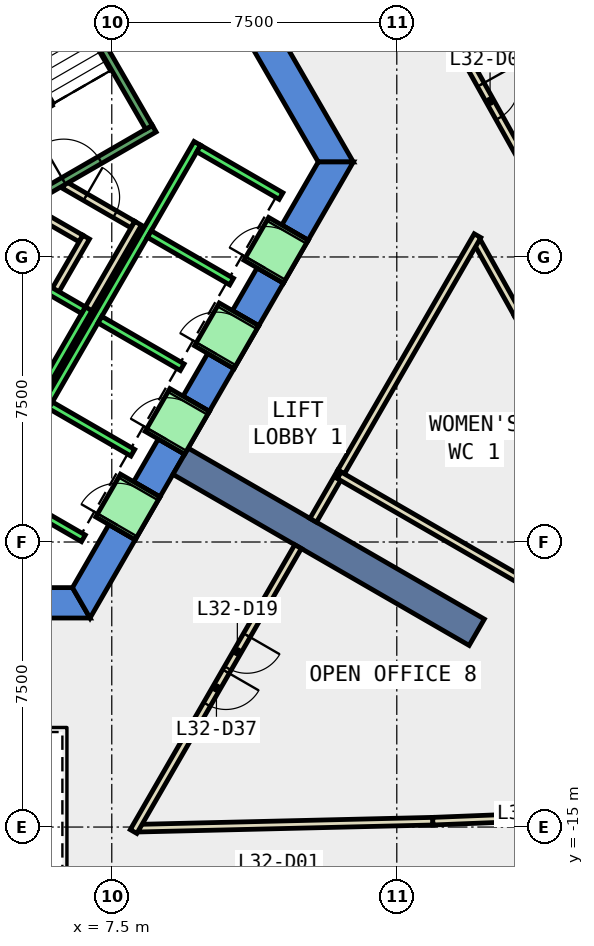
"""IFC4 building model, lengths in metres.
Left out: names, types, materials, properties, quantities, classifications, styles, units other than length and angle.
Written with IfcOpenShell. Run it as: python <this file> out.ifc"""

import sys

from ifc_helpers import new_model, si_unit, direction, frame, frame_2d, origin, place, context, subcontext, project, spatial, polyline, rectangle, outline, extrude, element, fill, save


model = new_model("IFC4")
c1 = context("Model", 3, precision=1e-05, world=origin(), true_north=direction((0.0, 1.0)))
c2 = subcontext(c1, "Body", "Model", "MODEL_VIEW")
j1 = project(units=[si_unit("LENGTHUNIT", "METRE"), si_unit("PLANEANGLEUNIT", "RADIAN")], contexts=[c1])
p1 = place(None, origin())
s1 = spatial("IfcSite", under=j1, at=p1, CompositionType="ELEMENT")
p2 = place(p1, origin())
s2 = spatial("IfcBuilding", under=s1, at=p2, CompositionType="ELEMENT")
p3 = place(p2, frame((0.0, 0.0, 146.6)))
s3 = spatial("IfcBuildingStorey", under=s2, at=p3, CompositionType="ELEMENT", Elevation=146.6)
p4 = place(p3, frame((0.0, 0.0, -0.4)))
e1 = element("IfcWall", 1, at=p4, inside=s3, PredefinedType="SHEAR", context=c2, shape_type="SweptSolid", body=[
    extrude(outline(polyline([(8.517, 11.748), (7.824, 11.348), (12.933, 2.5), (13.856, 2.5), (8.517, 11.748)])), origin(), (0.0, 0.0, 1.0), 4.2),
])
p5 = place(p3, frame((0.0, 0.0, -0.4)))
e2 = element("IfcWall", 2, at=p5, inside=s3, PredefinedType="SHEAR", context=c2, shape_type="SweptSolid", body=[
    extrude(outline(polyline([(5.75, -8.7), (5.75, -9.5), (6.928, -9.5), (6.466, -8.7), (5.75, -8.7)])), origin(), (0.0, 0.0, 1.0), 4.2),
])
p6 = place(p3, frame((0.0, 0.0, -0.4)))
e3 = element("IfcWall", 3, at=p6, inside=s3, PredefinedType="SHEAR", context=c2, shape_type="SweptSolid", body=[
    extrude(outline(polyline([(8.117, -7.44), (7.424, -7.04), (6.466, -8.7), (6.928, -9.5), (8.117, -7.44)])), origin(), (0.0, 0.0, 1.0), 4.2),
])
p7 = place(p3, frame((0.0, 0.0, -0.4)))
e4 = element("IfcWall", 4, at=p7, inside=s3, PredefinedType="SHEAR", context=c2, shape_type="SweptSolid", body=[
    extrude(outline(polyline([(9.417, -5.189), (8.724, -4.789), (8.075, -5.914), (8.767, -6.314), (9.417, -5.189)])), origin(), (0.0, 0.0, 1.0), 4.2),
])
p8 = place(p3, frame((0.0, 0.0, -0.4)))
e5 = element("IfcWall", 5, at=p8, inside=s3, PredefinedType="SHEAR", context=c2, shape_type="SweptSolid", body=[
    extrude(outline(polyline([(10.717, -2.937), (10.025, -2.537), (9.374, -3.663), (10.067, -4.063), (10.717, -2.937)])), origin(), (0.0, 0.0, 1.0), 4.2),
])
p9 = place(p3, frame((0.0, 0.0, -0.4)))
e6 = element("IfcWall", 6, at=p9, inside=s3, PredefinedType="SHEAR", context=c2, shape_type="SweptSolid", body=[
    extrude(outline(polyline([(12.017, -0.686), (11.324, -0.286), (10.675, -1.411), (11.367, -1.811), (12.017, -0.686)])), origin(), (0.0, 0.0, 1.0), 4.2),
])
p10 = place(p3, frame((0.0, 0.0, -0.4)))
e7 = element("IfcWall", 7, at=p10, inside=s3, PredefinedType="SHEAR", context=c2, shape_type="SweptSolid", body=[
    extrude(outline(polyline([(11.974, 0.84), (12.667, 0.44), (13.856, 2.5), (12.933, 2.5), (11.974, 0.84)])), origin(), (0.0, 0.0, 1.0), 4.2),
])
p11 = place(p3, frame((0.0, 0.0, 3.6)))
e8 = element("IfcWall", 8, at=p11, inside=s3, PredefinedType="SHEAR", context=c2, shape_type="SweptSolid", body=[
    extrude(outline(polyline([(8.767, -6.314), (8.075, -5.914), (7.424, -7.04), (8.117, -7.44), (8.767, -6.314)])), origin(), (0.0, 0.0, 1.0), 0.2),
])
p12 = place(p3, frame((0.0, 0.0, 3.6)))
e9 = element("IfcWall", 9, at=p12, inside=s3, PredefinedType="SHEAR", context=c2, shape_type="SweptSolid", body=[
    extrude(outline(polyline([(10.067, -4.063), (9.374, -3.663), (8.724, -4.789), (9.417, -5.189), (10.067, -4.063)])), origin(), (0.0, 0.0, 1.0), 0.2),
])
p13 = place(p3, frame((0.0, 0.0, 3.6)))
e10 = element("IfcWall", 10, at=p13, inside=s3, PredefinedType="SHEAR", context=c2, shape_type="SweptSolid", body=[
    extrude(outline(polyline([(11.367, -1.811), (10.675, -1.411), (10.025, -2.537), (10.717, -2.937), (11.367, -1.811)])), origin(), (0.0, 0.0, 1.0), 0.2),
])
p14 = place(p3, frame((0.0, 0.0, 3.6)))
e11 = element("IfcWall", 11, at=p14, inside=s3, PredefinedType="SHEAR", context=c2, shape_type="SweptSolid", body=[
    extrude(outline(polyline([(12.667, 0.44), (11.974, 0.84), (11.324, -0.286), (12.017, -0.686), (12.667, 0.44)])), origin(), (0.0, 0.0, 1.0), 0.2),
])
p15 = place(p3, frame((9.31, -5.375, -0.4), z_axis=(0.0, 0.0, 1.0), x_axis=(0.866017533419, -0.500013631625, 0.0)))
e12 = element("IfcWall", 12, at=p15, inside=s3, PredefinedType="SHEAR", context=c2, shape_type="SweptSolid", body=[
    extrude(rectangle(XDim=9.0, YDim=0.8, at=frame_2d((4.5, 0.0))), origin(), (0.0, 0.0, 1.0), 4.2),
])
p16 = place(p3, frame((8.223, -15.029, 0.0), z_axis=(0.0, 0.0, 1.0), x_axis=(0.99971920994, 0.023696018186, 0.0)))
e13 = element("IfcWall", 13, at=p16, inside=s3, PredefinedType="PARTITIONING", context=c2, shape_type="SweptSolid", body=[
    extrude(rectangle(XDim=7.727, YDim=0.2, at=frame_2d((3.864, 0.0))), origin(), (0.0, 0.0, 1.0), 3.8),
])
p17 = place(p3, frame((15.948, -14.846, 0.0), z_axis=(0.0, 0.0, 1.0), x_axis=(0.999208477774, 0.039779617206, 0.0)))
e14 = element("IfcWall", 14, at=p17, inside=s3, PredefinedType="PARTITIONING", context=c2, shape_type="SweptSolid", body=[
    extrude(rectangle(XDim=2.639, YDim=0.2, at=frame_2d((1.32, 0.0))), origin(), (0.0, 0.0, 1.0), 3.8),
])
p18 = place(p3, frame((18.178, -1.501, 0.0), z_axis=(0.0, 0.0, 1.0), x_axis=(-0.487980809747, 0.872854357449, 0.0)))
e15 = element("IfcWall", 15, at=p18, inside=s3, PredefinedType="PARTITIONING", context=c2, shape_type="SweptSolid", body=[
    extrude(rectangle(XDim=2.162, YDim=0.2, at=frame_2d((1.081, 0.0))), origin(), (0.0, 0.0, 1.0), 3.8),
])
p19 = place(p3, frame((16.624, 5.582, 0.0), z_axis=(0.0, 0.0, 1.0), x_axis=(0.487871212611, -0.872915620152, 0.0)))
e16 = element("IfcWall", 16, at=p19, inside=s3, PredefinedType="PARTITIONING", context=c2, shape_type="SweptSolid", body=[
    extrude(rectangle(XDim=3.402, YDim=0.2, at=frame_2d((1.701, 0.0))), origin(), (0.0, 0.0, 1.0), 3.8),
])
p20 = place(p19, frame((1.202, 0.0, 0.0)))
e17 = element("IfcOpeningElement", 17, at=p20, cuts=e16, PredefinedType="OPENING", context=c2, shape_type="SweptSolid", body=[
    extrude(rectangle(XDim=1.0, YDim=2.1, at=frame_2d((0.5, 1.05))), frame((0.0, 0.11, 0.0), z_axis=(0.0, -1.0, 0.0), x_axis=(1.0, 0.0, 0.0)), (0.0, 0.0, 1.0), 0.22),
])
p21 = place(p3, frame((5.499, 1.172, 0.0), z_axis=(0.0, 0.0, 1.0), x_axis=(0.866333505267, -0.499465972466, 0.0)))
e18 = element("IfcWall", 18, at=p21, inside=s3, PredefinedType="PARTITIONING", context=c2, shape_type="SweptSolid", body=[
    extrude(rectangle(XDim=1.374, YDim=0.2, at=frame_2d((0.687, 0.0))), origin(), (0.0, 0.0, 1.0), 3.8),
])
p22 = place(p3, frame((6.826, 0.522, 0.0), z_axis=(0.0, 0.0, 1.0), x_axis=(-0.500016722714, -0.866015748706, 0.0)))
e19 = element("IfcWall", 19, at=p22, inside=s3, PredefinedType="PARTITIONING", context=c2, shape_type="SweptSolid", body=[
    extrude(rectangle(XDim=1.7, YDim=0.2, at=frame_2d((0.85, 0.0))), origin(), (0.0, 0.0, 1.0), 3.8),
])
p23 = place(p3, frame((6.25, 1.894, 0.0), z_axis=(0.0, 0.0, 1.0), x_axis=(0.866043184279, -0.499969202016, 0.0)))
e20 = element("IfcWall", 20, at=p23, inside=s3, PredefinedType="PARTITIONING", context=c2, shape_type="SweptSolid", body=[
    extrude(rectangle(XDim=2.084, YDim=0.2, at=frame_2d((1.042, 0.0))), origin(), (0.0, 0.0, 1.0), 3.8),
])
p24 = place(p23, frame((0.642, 0.0, 0.0)))
e21 = element("IfcOpeningElement", 21, at=p24, cuts=e20, PredefinedType="OPENING", context=c2, shape_type="SweptSolid", body=[
    extrude(rectangle(XDim=0.9, YDim=2.1, at=frame_2d((0.45, 1.05))), frame((0.0, 0.11, 0.0), z_axis=(0.0, -1.0, 0.0), x_axis=(1.0, 0.0, 0.0)), (0.0, 0.0, 1.0), 0.22),
])
p25 = place(p3, frame((8.192, 0.888, 0.0), z_axis=(0.0, 0.0, 1.0), x_axis=(-0.499940625693, -0.866059680843, 0.0)))
e22 = element("IfcWall", 22, at=p25, inside=s3, PredefinedType="PARTITIONING", context=c2, shape_type="SweptSolid", body=[
    extrude(rectangle(XDim=2.68, YDim=0.2, at=frame_2d((1.34, 0.0))), origin(), (0.0, 0.0, 1.0), 3.8),
])
p26 = place(p3, frame((13.535, -5.657, 0.0), z_axis=(0.0, 0.0, 1.0), x_axis=(-0.499751238113, -0.866168978898, 0.0)))
e23 = element("IfcWall", 23, at=p26, inside=s3, PredefinedType="PARTITIONING", context=c2, shape_type="SweptSolid", body=[
    extrude(rectangle(XDim=1.469, YDim=0.2, at=frame_2d((0.734, 0.0))), origin(), (0.0, 0.0, 1.0), 3.8),
])
p27 = place(p3, frame((17.124, 0.56, 0.0), z_axis=(0.0, 0.0, 1.0), x_axis=(-0.49996876383, -0.866043437245, 0.0)))
e24 = element("IfcWall", 24, at=p27, inside=s3, PredefinedType="PARTITIONING", context=c2, shape_type="SweptSolid", body=[
    extrude(rectangle(XDim=7.179, YDim=0.2, at=frame_2d((3.589, 0.0))), origin(), (0.0, 0.0, 1.0), 3.8),
])
p28 = place(p3, frame((13.485, -5.744, 0.0), z_axis=(0.0, 0.0, 1.0), x_axis=(0.865950545648, -0.500129635687, 0.0)))
e25 = element("IfcWall", 25, at=p28, inside=s3, PredefinedType="PARTITIONING", context=c2, shape_type="SweptSolid", body=[
    extrude(rectangle(XDim=9.1, YDim=0.2, at=frame_2d((4.55, 0.0))), origin(), (0.0, 0.0, 1.0), 3.8),
])
p29 = place(p3, frame((12.401, -7.621, 0.0), z_axis=(0.0, 0.0, 1.0), x_axis=(-0.499964151829, -0.866046099747, 0.0)))
e26 = element("IfcWall", 26, at=p29, inside=s3, PredefinedType="PARTITIONING", context=c2, shape_type="SweptSolid", body=[
    extrude(rectangle(XDim=8.656, YDim=0.2, at=frame_2d((4.328, 0.0))), origin(), (0.0, 0.0, 1.0), 3.8),
])
p30 = place(p29, frame((2.694, 0.0, 0.0)))
e27 = element("IfcOpeningElement", 27, at=p30, cuts=e26, PredefinedType="OPENING", context=c2, shape_type="SweptSolid", body=[
    extrude(rectangle(XDim=1.0, YDim=2.1, at=frame_2d((0.5, 1.05))), frame((0.0, 0.11, 0.0), z_axis=(0.0, -1.0, 0.0), x_axis=(1.0, 0.0, 0.0)), (0.0, 0.0, 1.0), 0.22),
])
p31 = place(p29, frame((3.794, 0.0, 0.0)))
e28 = element("IfcOpeningElement", 28, at=p31, cuts=e26, PredefinedType="OPENING", context=c2, shape_type="SweptSolid", body=[
    extrude(rectangle(XDim=1.0, YDim=2.1, at=frame_2d((0.5, 1.05))), frame((0.0, 0.11, 0.0), z_axis=(0.0, -1.0, 0.0), x_axis=(1.0, 0.0, 0.0)), (0.0, 0.0, 1.0), 0.22),
])
p32 = place(p3, frame((5.492, -3.788, 0.0), z_axis=(0.0, 0.0, 1.0), x_axis=(0.500011755427, 0.866018616679, 0.0)))
e29 = element("IfcWall", 29, at=p32, inside=s3, PredefinedType="STANDARD", context=c2, shape_type="SweptSolid", body=[
    extrude(rectangle(XDim=2.8, YDim=0.2, at=frame_2d((1.4, 0.0))), origin(), (0.0, 0.0, 1.0), 3.8),
])
p33 = place(p3, frame((4.677, -0.2, 0.0), z_axis=(0.0, 0.0, 1.0), x_axis=(0.865973769406, -0.500089422704, 0.0)))
e30 = element("IfcWall", 30, at=p33, inside=s3, PredefinedType="STANDARD", context=c2, shape_type="SweptSolid", body=[
    extrude(rectangle(XDim=2.399, YDim=0.2, at=frame_2d((1.2, 0.0))), origin(), (0.0, 0.0, 1.0), 3.8),
])
p34 = place(p3, frame((4.451, -6.19, 0.0), z_axis=(0.0, 0.0, 1.0), x_axis=(0.50000090737, 0.866024879913, 0.0)))
e31 = element("IfcWall", 31, at=p34, inside=s3, PredefinedType="STANDARD", context=c2, shape_type="SweptSolid", body=[
    extrude(rectangle(XDim=10.6, YDim=0.2, at=frame_2d((5.3, 0.0))), origin(), (0.0, 0.0, 1.0), 3.8),
])
for number, where, z_axis, x_axis in (
    (32, (4.588, -6.153, 0.0), (0.0, 0.0, 1.0), (0.866, -0.5, 0.0)),
    (33, (5.888, -3.902, 0.0), (0.0, 0.0, 1.0), (0.866, -0.5, 0.0)),
    (34, (7.188, -1.65, 0.0), (0.0, 0.0, 1.0), (0.866, -0.5, 0.0)),
    (35, (8.488, 0.602, 0.0), (0.0, 0.0, 1.0), (0.866, -0.5, 0.0)),
):
    element("IfcWall", number, at=place(p3, frame(where, z_axis=z_axis, x_axis=x_axis)), inside=s3, PredefinedType="STANDARD", context=c2, shape_type="SweptSolid", body=[
        extrude(rectangle(XDim=2.5, YDim=0.2, at=frame_2d((1.25, 0.0))), origin(), (0.0, 0.0, 1.0), 3.8),
    ])
p35 = place(p3, frame((9.788, 2.853, 0.0), z_axis=(0.0, 0.0, 1.0), x_axis=(0.865998541277, -0.500046524342, 0.0)))
e36 = element("IfcWall", 36, at=p35, inside=s3, PredefinedType="STANDARD", context=c2, shape_type="SweptSolid", body=[
    extrude(rectangle(XDim=2.5, YDim=0.2, at=frame_2d((1.25, 0.0))), origin(), (0.0, 0.0, 1.0), 3.8),
])
p36 = place(p3, frame((7.598, -7.14, 0.0), z_axis=(0.0, 0.0, 1.0), x_axis=(0.500362116554, 0.865816234728, 0.0)))
e37 = element("IfcWall", 37, at=p36, inside=s3, PredefinedType="STANDARD", context=c2, shape_type="SweptSolid", body=[
    extrude(rectangle(XDim=1.299, YDim=1.2, at=frame_2d((0.65, 0.0))), origin(), (0.0, 0.0, 1.0), 2.4),
])
p37 = place(p36, frame((0.1, 0.0, 0.0)))
e38 = element("IfcOpeningElement", 38, at=p37, cuts=e37, PredefinedType="OPENING", context=c2, shape_type="SweptSolid", body=[
    extrude(rectangle(XDim=1.1, YDim=2.3, at=frame_2d((0.55, 1.15))), frame((0.0, 0.61, 0.0), z_axis=(0.0, -1.0, 0.0), x_axis=(1.0, 0.0, 0.0)), (0.0, 0.0, 1.0), 1.22),
])
p38 = place(p3, frame((8.898, -4.889, 0.0), z_axis=(0.0, 0.0, 1.0), x_axis=(0.500036693733, 0.866004217611, 0.0)))
e39 = element("IfcWall", 39, at=p38, inside=s3, PredefinedType="STANDARD", context=c2, shape_type="SweptSolid", body=[
    extrude(rectangle(XDim=1.3, YDim=1.2, at=frame_2d((0.65, 0.0))), origin(), (0.0, 0.0, 1.0), 2.4),
])
p39 = place(p38, frame((0.1, 0.0, 0.0)))
e40 = element("IfcOpeningElement", 40, at=p39, cuts=e39, PredefinedType="OPENING", context=c2, shape_type="SweptSolid", body=[
    extrude(rectangle(XDim=1.1, YDim=2.3, at=frame_2d((0.55, 1.15))), frame((0.0, 0.61, 0.0), z_axis=(0.0, -1.0, 0.0), x_axis=(1.0, 0.0, 0.0)), (0.0, 0.0, 1.0), 1.22),
])
p40 = place(p3, frame((10.198, -2.637, 0.0), z_axis=(0.0, 0.0, 1.0), x_axis=(0.49989585183, 0.866085525409, 0.0)))
e41 = element("IfcWall", 41, at=p40, inside=s3, PredefinedType="STANDARD", context=c2, shape_type="SweptSolid", body=[
    extrude(rectangle(XDim=1.3, YDim=1.2, at=frame_2d((0.65, 0.0))), origin(), (0.0, 0.0, 1.0), 2.4),
])
p41 = place(p40, frame((0.1, 0.0, 0.0)))
e42 = element("IfcOpeningElement", 42, at=p41, cuts=e41, PredefinedType="OPENING", context=c2, shape_type="SweptSolid", body=[
    extrude(rectangle(XDim=1.1, YDim=2.3, at=frame_2d((0.55, 1.15))), frame((0.0, 0.61, 0.0), z_axis=(0.0, -1.0, 0.0), x_axis=(1.0, 0.0, 0.0)), (0.0, 0.0, 1.0), 1.22),
])
p42 = place(p3, frame((11.498, -0.385, 0.0), z_axis=(0.0, 0.0, 1.0), x_axis=(0.500221244143, 0.865897630733, 0.0)))
e43 = element("IfcWall", 43, at=p42, inside=s3, PredefinedType="STANDARD", context=c2, shape_type="SweptSolid", body=[
    extrude(rectangle(XDim=1.299, YDim=1.2, at=frame_2d((0.65, 0.0))), origin(), (0.0, 0.0, 1.0), 2.4),
])
p43 = place(p42, frame((0.1, 0.0, 0.0)))
e44 = element("IfcOpeningElement", 44, at=p43, cuts=e43, PredefinedType="OPENING", context=c2, shape_type="SweptSolid", body=[
    extrude(rectangle(XDim=1.1, YDim=2.3, at=frame_2d((0.55, 1.15))), frame((0.0, 0.61, 0.0), z_axis=(0.0, -1.0, 0.0), x_axis=(1.0, 0.0, 0.0)), (0.0, 0.0, 1.0), 1.22),
])
p44 = place(p3, frame((4.806, 1.176, 0.0), z_axis=(0.0, 0.0, 1.0), x_axis=(0.866059941101, 0.499940174841, 0.0)))
e45 = element("IfcWall", 45, at=p44, inside=s3, PredefinedType="STANDARD", context=c2, shape_type="SweptSolid", body=[
    extrude(rectangle(XDim=4.4, YDim=0.2, at=frame_2d((2.2, 0.0))), origin(), (0.0, 0.0, 1.0), 3.8),
])
p45 = place(p44, frame((1.65, 0.0, 0.0)))
e46 = element("IfcOpeningElement", 46, at=p45, cuts=e45, PredefinedType="OPENING", context=c2, shape_type="SweptSolid", body=[
    extrude(rectangle(XDim=1.1, YDim=2.2, at=frame_2d((0.55, 1.1))), frame((0.0, 0.11, 0.0), z_axis=(0.0, -1.0, 0.0), x_axis=(1.0, 0.0, 0.0)), (0.0, 0.0, 1.0), 0.22),
])
p46 = place(p3, frame((8.48, 3.412, 0.0), z_axis=(0.0, 0.0, 1.0), x_axis=(-0.499978703459, 0.866037698999, 0.0)))
e47 = element("IfcWall", 47, at=p46, inside=s3, PredefinedType="STANDARD", context=c2, shape_type="SweptSolid", body=[
    extrude(rectangle(XDim=6.9, YDim=0.2, at=frame_2d((3.45, 0.0))), origin(), (0.0, 0.0, 1.0), 3.8),
])
p47 = place(p20, origin())
e48 = element("IfcDoor", 48, at=p47, inside=s3, OperationType="SINGLE_SWING_LEFT", PredefinedType="DOOR", context=c2, shape_type="SweptSolid", body=[
    extrude(rectangle(XDim=1.0, YDim=2.1, at=frame_2d((0.5, 1.05))), frame((0.0, 0.025, 0.0), z_axis=(0.0, -1.0, 0.0), x_axis=(1.0, 0.0, 0.0)), (0.0, 0.0, 1.0), 0.05),
])
fill(e17, e48)
p48 = place(p30, origin())
e49 = element("IfcDoor", 49, at=p48, inside=s3, OperationType="SINGLE_SWING_LEFT", PredefinedType="DOOR", context=c2, shape_type="SweptSolid", body=[
    extrude(rectangle(XDim=1.0, YDim=2.1, at=frame_2d((0.5, 1.05))), frame((0.0, 0.025, 0.0), z_axis=(0.0, -1.0, 0.0), x_axis=(1.0, 0.0, 0.0)), (0.0, 0.0, 1.0), 0.05),
])
fill(e27, e49)
p49 = place(p24, origin())
e50 = element("IfcDoor", 50, at=p49, inside=s3, OperationType="SINGLE_SWING_LEFT", PredefinedType="DOOR", context=c2, shape_type="SweptSolid", body=[
    extrude(rectangle(XDim=0.9, YDim=2.1, at=frame_2d((0.45, 1.05))), frame((0.0, 0.025, 0.0), z_axis=(0.0, -1.0, 0.0), x_axis=(1.0, 0.0, 0.0)), (0.0, 0.0, 1.0), 0.05),
])
fill(e21, e50)
p50 = place(p31, origin())
e51 = element("IfcDoor", 51, at=p50, inside=s3, OperationType="SINGLE_SWING_RIGHT", PredefinedType="DOOR", context=c2, shape_type="SweptSolid", body=[
    extrude(rectangle(XDim=1.0, YDim=2.1, at=frame_2d((0.5, 1.05))), frame((0.0, 0.025, 0.0), z_axis=(0.0, -1.0, 0.0), x_axis=(1.0, 0.0, 0.0)), (0.0, 0.0, 1.0), 0.05),
])
fill(e28, e51)
p51 = place(p37, origin())
e52 = element("IfcDoor", 52, at=p51, inside=s3, OperationType="SLIDING_TO_LEFT", PredefinedType="DOOR", context=c2, shape_type="SweptSolid", body=[
    extrude(rectangle(XDim=1.1, YDim=2.3, at=frame_2d((0.55, 1.15))), frame((0.0, 0.025, 0.0), z_axis=(0.0, -1.0, 0.0), x_axis=(1.0, 0.0, 0.0)), (0.0, 0.0, 1.0), 0.05),
])
fill(e38, e52)
p52 = place(p39, origin())
e53 = element("IfcDoor", 53, at=p52, inside=s3, OperationType="SLIDING_TO_LEFT", PredefinedType="DOOR", context=c2, shape_type="SweptSolid", body=[
    extrude(rectangle(XDim=1.1, YDim=2.3, at=frame_2d((0.55, 1.15))), frame((0.0, 0.025, 0.0), z_axis=(0.0, -1.0, 0.0), x_axis=(1.0, 0.0, 0.0)), (0.0, 0.0, 1.0), 0.05),
])
fill(e40, e53)
p53 = place(p41, origin())
e54 = element("IfcDoor", 54, at=p53, inside=s3, OperationType="SLIDING_TO_LEFT", PredefinedType="DOOR", context=c2, shape_type="SweptSolid", body=[
    extrude(rectangle(XDim=1.1, YDim=2.3, at=frame_2d((0.55, 1.15))), frame((0.0, 0.025, 0.0), z_axis=(0.0, -1.0, 0.0), x_axis=(1.0, 0.0, 0.0)), (0.0, 0.0, 1.0), 0.05),
])
fill(e42, e54)
p54 = place(p43, origin())
e55 = element("IfcDoor", 55, at=p54, inside=s3, OperationType="SLIDING_TO_LEFT", PredefinedType="DOOR", context=c2, shape_type="SweptSolid", body=[
    extrude(rectangle(XDim=1.1, YDim=2.3, at=frame_2d((0.55, 1.15))), frame((0.0, 0.025, 0.0), z_axis=(0.0, -1.0, 0.0), x_axis=(1.0, 0.0, 0.0)), (0.0, 0.0, 1.0), 0.05),
])
fill(e44, e55)
p55 = place(p45, origin())
e56 = element("IfcDoor", 56, at=p55, inside=s3, OperationType="SINGLE_SWING_LEFT", PredefinedType="DOOR", context=c2, shape_type="SweptSolid", body=[
    extrude(rectangle(XDim=1.1, YDim=2.2, at=frame_2d((0.55, 1.1))), frame((0.0, 0.025, 0.0), z_axis=(0.0, -1.0, 0.0), x_axis=(1.0, 0.0, 0.0)), (0.0, 0.0, 1.0), 0.05),
])
fill(e46, e56)
save(model, sys.argv[1])
